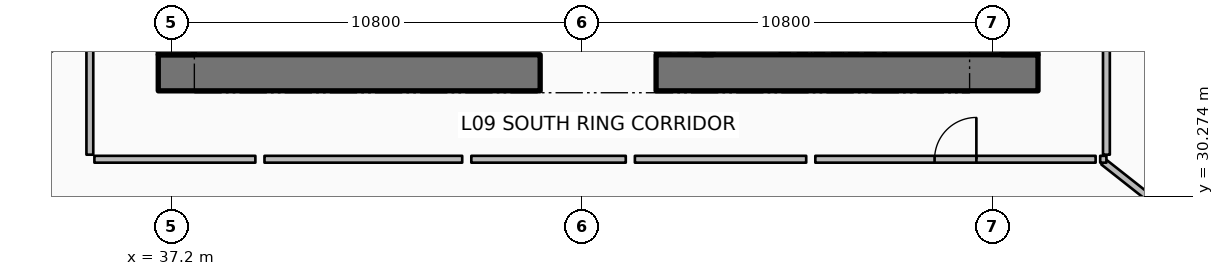
"""IFC4 building model, lengths in metres.
Left out: names, types, materials, properties, quantities, classifications, styles, units other than length and angle.
Written with IfcOpenShell. Run it as: python <this file> out.ifc"""

import sys

from ifc_helpers import new_model, si_unit, direction, frame, frame_2d, origin, place, context, subcontext, project, spatial, rectangle, extrude, element, fill, save


model = new_model("IFC4")
c1 = context("Model", 3, precision=1e-05, world=origin(), true_north=direction((0.0, 1.0)))
c2 = subcontext(c1, "Body", "Model", "MODEL_VIEW")
j1 = project(units=[si_unit("LENGTHUNIT", "METRE"), si_unit("PLANEANGLEUNIT", "RADIAN")], contexts=[c1])
p1 = place(None, origin())
s1 = spatial("IfcSite", under=j1, at=p1, CompositionType="ELEMENT")
p2 = place(p1, origin())
s2 = spatial("IfcBuilding", under=s1, at=p2, CompositionType="ELEMENT")
p3 = place(p2, frame((0.0, 0.0, 41.4)))
s3 = spatial("IfcBuildingStorey", under=s2, at=p3, CompositionType="ELEMENT", Elevation=41.4)
p4 = place(p3, frame((36.85, 33.525, 0.0), z_axis=(0.0, 0.0, 1.0), x_axis=(1.0, 0.0, 0.0)))
e1 = element("IfcWall", 1, at=p4, inside=s3, PredefinedType="SHEAR", context=c2, shape_type="SweptSolid", body=[
    extrude(rectangle(XDim=10.05, YDim=0.95, at=frame_2d((5.025, 0.0))), origin(), (0.0, 0.0, 1.0), 3.75),
])
p5 = place(p3, frame((49.95, 33.525, 0.0), z_axis=(0.0, 0.0, 1.0), x_axis=(1.0, 0.0, 0.0)))
e2 = element("IfcWall", 2, at=p5, inside=s3, PredefinedType="SHEAR", context=c2, shape_type="SweptSolid", body=[
    extrude(rectangle(XDim=10.05, YDim=0.95, at=frame_2d((5.025, 0.0))), origin(), (0.0, 0.0, 1.0), 3.75),
])
for number, where, z_axis, x_axis in (
    (3, (37.325, 34.0, 0.0), (0.0, 0.0, 1.0), (0.0, 1.0, 0.0)),
    (4, (59.525, 34.0, 0.0), (0.0, 0.0, 1.0), (0.0, 1.0, 0.0)),
):
    element("IfcWall", number, at=place(p3, frame(where, z_axis=z_axis, x_axis=x_axis)), inside=s3, PredefinedType="SHEAR", context=c2, shape_type="SweptSolid", body=[
        extrude(rectangle(XDim=16.0, YDim=0.95, at=frame_2d((8.0, 0.0))), origin(), (0.0, 0.0, 1.0), 3.75),
    ])
p6 = place(p3, frame((51.31, 34.0, 0.0), z_axis=(0.0, 0.0, 1.0), x_axis=(0.0, 1.0, 0.0)))
e5 = element("IfcWall", 5, at=p6, inside=s3, PredefinedType="SHEAR", context=c2, shape_type="SweptSolid", body=[
    extrude(rectangle(XDim=3.5, YDim=0.28, at=frame_2d((1.75, 0.0))), origin(), (0.0, 0.0, 1.0), 3.75),
])
p7 = place(p3, frame((34.954, 34.694, 0.0), z_axis=(0.0, 0.0, 1.0), x_axis=(-0.872493465611, -0.488625779577, 0.0)))
e6 = element("IfcWall", 6, at=p7, inside=s3, PredefinedType="PARTITIONING", context=c2, shape_type="SweptSolid", body=[
    extrude(rectangle(XDim=16.586, YDim=0.18, at=frame_2d((8.293, 0.0))), origin(), (0.0, 0.0, 1.0), 2.867),
])
p8 = place(p3, frame((61.723, 31.182, 0.0), z_axis=(0.0, 0.0, 1.0), x_axis=(0.785321288316, -0.619088421889, 0.0)))
e7 = element("IfcWall", 7, at=p8, inside=s3, PredefinedType="PARTITIONING", context=c2, shape_type="SweptSolid", body=[
    extrude(rectangle(XDim=10.598, YDim=0.18, at=frame_2d((5.299, 0.0))), origin(), (0.0, 0.0, 1.0), 2.867),
])
p9 = place(p3, frame((54.14, 31.25, 0.0), z_axis=(0.0, 0.0, 1.0), x_axis=(1.0, 0.0, 0.0)))
e8 = element("IfcWall", 8, at=p9, inside=s3, PredefinedType="PARTITIONING", context=c2, shape_type="SweptSolid", body=[
    extrude(rectangle(XDim=7.376, YDim=0.18, at=frame_2d((3.688, 0.0))), origin(), (0.0, 0.0, 1.0), 2.867),
])
p10 = place(p9, frame((3.138, 0.0, 0.0)))
e9 = element("IfcOpeningElement", 9, at=p10, cuts=e8, PredefinedType="OPENING", context=c2, shape_type="SweptSolid", body=[
    extrude(rectangle(XDim=1.1, YDim=2.1, at=frame_2d((0.55, 1.05))), frame((0.0, 0.1, 0.0), z_axis=(0.0, -1.0, 0.0), x_axis=(1.0, 0.0, 0.0)), (0.0, 0.0, 1.0), 0.2),
])
p11 = place(p3, frame((35.05, 34.628, 0.0), z_axis=(0.0, 0.0, 1.0), x_axis=(0.0, -1.0, 0.0)))
e10 = element("IfcWall", 10, at=p11, inside=s3, PredefinedType="PARTITIONING", context=c2, shape_type="SweptSolid", body=[
    extrude(rectangle(XDim=3.258, YDim=0.18, at=frame_2d((1.629, 0.0))), origin(), (0.0, 0.0, 1.0), 2.867),
])
p12 = place(p3, frame((35.17, 31.25, 0.0), z_axis=(0.0, 0.0, 1.0), x_axis=(1.0, 0.0, 0.0)))
e11 = element("IfcWall", 11, at=p12, inside=s3, PredefinedType="PARTITIONING", context=c2, shape_type="SweptSolid", body=[
    extrude(rectangle(XDim=4.236, YDim=0.18, at=frame_2d((2.118, 0.0))), origin(), (0.0, 0.0, 1.0), 2.867),
])
p13 = place(p3, frame((39.646, 31.25, 0.0), z_axis=(0.0, 0.0, 1.0), x_axis=(1.0, 0.0, 0.0)))
e12 = element("IfcWall", 12, at=p13, inside=s3, PredefinedType="PARTITIONING", context=c2, shape_type="SweptSolid", body=[
    extrude(rectangle(XDim=5.203, YDim=0.18, at=frame_2d((2.601, 0.0))), origin(), (0.0, 0.0, 1.0), 2.867),
])
p14 = place(p3, frame((45.088, 31.25, 0.0), z_axis=(0.0, 0.0, 1.0), x_axis=(1.0, 0.0, 0.0)))
e13 = element("IfcWall", 13, at=p14, inside=s3, PredefinedType="PARTITIONING", context=c2, shape_type="SweptSolid", body=[
    extrude(rectangle(XDim=4.064, YDim=0.18, at=frame_2d((2.032, 0.0))), origin(), (0.0, 0.0, 1.0), 2.867),
])
p15 = place(p3, frame((49.392, 31.25, 0.0), z_axis=(0.0, 0.0, 1.0), x_axis=(1.0, 0.0, 0.0)))
e14 = element("IfcWall", 14, at=p15, inside=s3, PredefinedType="PARTITIONING", context=c2, shape_type="SweptSolid", body=[
    extrude(rectangle(XDim=4.508, YDim=0.18, at=frame_2d((2.254, 0.0))), origin(), (0.0, 0.0, 1.0), 2.867),
])
p16 = place(p3, frame((61.636, 31.25, 0.0), z_axis=(0.0, 0.0, 1.0), x_axis=(1.0, 0.0, 0.0)))
e15 = element("IfcWall", 15, at=p16, inside=s3, PredefinedType="PARTITIONING", context=c2, shape_type="SweptSolid", body=[
    extrude(rectangle(XDim=0.164, YDim=0.18, at=frame_2d((0.082, 0.0))), origin(), (0.0, 0.0, 1.0), 2.867),
])
p17 = place(p3, frame((61.8, 31.37, 0.0), z_axis=(0.0, 0.0, 1.0), x_axis=(0.0, 1.0, 0.0)))
e16 = element("IfcWall", 16, at=p17, inside=s3, PredefinedType="PARTITIONING", context=c2, shape_type="SweptSolid", body=[
    extrude(rectangle(XDim=6.618, YDim=0.18, at=frame_2d((3.309, 0.0))), origin(), (0.0, 0.0, 1.0), 2.867),
])
p18 = place(p17, frame((2.759, 0.0, 0.0)))
e17 = element("IfcOpeningElement", 17, at=p18, cuts=e16, PredefinedType="OPENING", context=c2, shape_type="SweptSolid", body=[
    extrude(rectangle(XDim=1.1, YDim=2.1, at=frame_2d((0.55, 1.05))), frame((0.0, 0.1, 0.0), z_axis=(0.0, -1.0, 0.0), x_axis=(1.0, 0.0, 0.0)), (0.0, 0.0, 1.0), 0.2),
])
p19 = place(p10, origin())
e18 = element("IfcDoor", 18, at=p19, inside=s3, OperationType="SINGLE_SWING_RIGHT", PredefinedType="DOOR", context=c2, shape_type="SweptSolid", body=[
    extrude(rectangle(XDim=1.1, YDim=2.1, at=frame_2d((0.55, 1.05))), frame((0.0, 0.025, 0.0), z_axis=(0.0, -1.0, 0.0), x_axis=(1.0, 0.0, 0.0)), (0.0, 0.0, 1.0), 0.05),
])
fill(e9, e18)
save(model, sys.argv[1])
